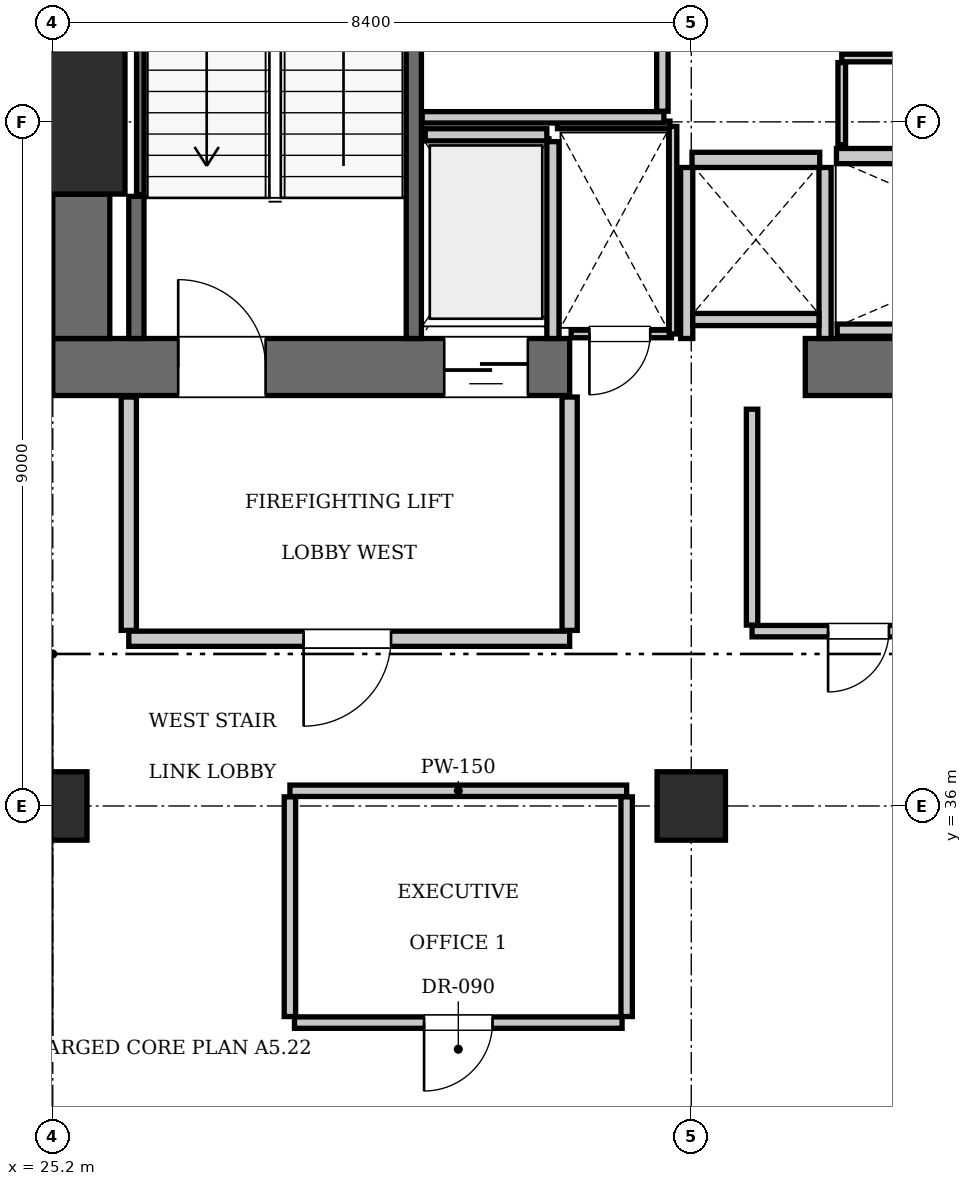
"""IFC4 building model, lengths in metres.
Left out: names, types, materials, properties, quantities, classifications, styles, units other than length and angle.
Written with IfcOpenShell. Run it as: python <this file> out.ifc"""

import sys

from ifc_helpers import new_model, si_unit, direction, frame, frame_2d, origin, origin_2d, place, context, subcontext, project, spatial, rectangle, extrude, element, fill, save


model = new_model("IFC4")
c1 = context("Model", 3, precision=1e-05, world=origin(), true_north=direction((0.0, 1.0)))
c2 = subcontext(c1, "Body", "Model", "MODEL_VIEW")
j1 = project(units=[si_unit("LENGTHUNIT", "METRE"), si_unit("PLANEANGLEUNIT", "RADIAN")], contexts=[c1])
p1 = place(None, origin())
s1 = spatial("IfcSite", under=j1, at=p1, CompositionType="ELEMENT")
p2 = place(p1, origin())
s2 = spatial("IfcBuilding", under=s1, at=p2, CompositionType="ELEMENT")
p3 = place(p2, frame((0.0, 0.0, 204.4)))
s3 = spatial("IfcBuildingStorey", under=s2, at=p3, CompositionType="ELEMENT", Elevation=204.4)
p4 = place(p3, frame((25.2, 45.0, 0.0), z_axis=(0.0, 0.0, 1.0), x_axis=(1.0, 0.0, 0.0)))
e1 = element("IfcColumn", 1, at=p4, inside=s3, PredefinedType="COLUMN", context=c2, shape_type="SweptSolid", body=[
    extrude(rectangle(XDim=1.9, YDim=1.9, at=origin_2d()), origin(), (0.0, 0.0, 1.0), 3.85),
])
p5 = place(p3, frame((25.2, 41.775, 0.0), z_axis=(0.0, 0.0, 1.0), x_axis=(1.0, 0.0, 0.0)))
e2 = element("IfcWall", 2, at=p5, inside=s3, PredefinedType="SHEAR", context=c2, shape_type="SweptSolid", body=[
    extrude(rectangle(XDim=6.8, YDim=0.75, at=frame_2d((3.4, 0.0))), origin(), (0.0, 0.0, 1.0), 3.85),
])
p6 = place(p5, frame((1.65, 0.0, 0.0)))
e3 = element("IfcOpeningElement", 3, at=p6, cuts=e2, PredefinedType="OPENING", context=c2, shape_type="SweptSolid", body=[
    extrude(rectangle(XDim=1.15, YDim=2.15, at=frame_2d((0.575, 1.075))), frame((0.0, 0.385, 0.0), z_axis=(0.0, -1.0, 0.0), x_axis=(1.0, 0.0, 0.0)), (0.0, 0.0, 1.0), 0.77),
])
p7 = place(p5, frame((5.15, 0.0, 0.0)))
e4 = element("IfcOpeningElement", 4, at=p7, cuts=e2, PredefinedType="OPENING", context=c2, shape_type="SweptSolid", body=[
    extrude(rectangle(XDim=1.1, YDim=2.2, at=frame_2d((0.55, 1.1))), frame((0.0, 0.385, 0.0), z_axis=(0.0, -1.0, 0.0), x_axis=(1.0, 0.0, 0.0)), (0.0, 0.0, 1.0), 0.77),
])
p8 = place(p3, frame((35.1, 41.775, 0.0), z_axis=(0.0, 0.0, 1.0), x_axis=(1.0, 0.0, 0.0)))
e5 = element("IfcWall", 5, at=p8, inside=s3, PredefinedType="SHEAR", context=c2, shape_type="SweptSolid", body=[
    extrude(rectangle(XDim=5.4, YDim=0.75, at=frame_2d((2.7, 0.0))), origin(), (0.0, 0.0, 1.0), 3.85),
])
p9 = place(p3, frame((25.575, 42.15, 0.0), z_axis=(0.0, 0.0, 1.0), x_axis=(0.0, 1.0, 0.0)))
e6 = element("IfcWall", 6, at=p9, inside=s3, PredefinedType="SHEAR", context=c2, shape_type="SweptSolid", body=[
    extrude(rectangle(XDim=1.9, YDim=0.75, at=frame_2d((0.95, 0.0))), origin(), (0.0, 0.0, 1.0), 3.85),
])
for number, where, z_axis, x_axis in (
    (7, (25.2, 36.0, 0.0), (0.0, 0.0, 1.0), (1.0, 0.0, 0.0)),
    (8, (33.6, 36.0, 0.0), (0.0, 0.0, 1.0), (1.0, 0.0, 0.0)),
):
    element("IfcColumn", number, at=place(p3, frame(where, z_axis=z_axis, x_axis=x_axis)), inside=s3, PredefinedType="COLUMN", context=c2, shape_type="SweptSolid", body=[
        extrude(rectangle(XDim=0.9, YDim=0.9, at=origin_2d()), origin(), (0.0, 0.0, 1.0), 3.85),
    ])
p10 = place(p3, frame((29.95, 42.15, 0.0), z_axis=(0.0, 0.0, 1.0), x_axis=(0.0, 1.0, 0.0)))
e9 = element("IfcWall", 9, at=p10, inside=s3, PredefinedType="SOLIDWALL", context=c2, shape_type="SweptSolid", body=[
    extrude(rectangle(XDim=9.0, YDim=0.2, at=frame_2d((4.5, 0.0))), origin(), (0.0, 0.0, 1.0), 3.61),
])
p11 = place(p3, frame((26.3, 42.15, 0.0), z_axis=(0.0, 0.0, 1.0), x_axis=(0.0, 1.0, 0.0)))
e10 = element("IfcWall", 10, at=p11, inside=s3, PredefinedType="SOLIDWALL", context=c2, shape_type="SweptSolid", body=[
    extrude(rectangle(XDim=1.87, YDim=0.2, at=frame_2d((0.935, 0.0))), origin(), (0.0, 0.0, 1.0), 3.61),
])
p12 = place(p3, frame((26.352, 44.04, 0.0), z_axis=(0.0, 0.0, 1.0), x_axis=(0.0, 1.0, 0.0)))
e11 = element("IfcWall", 11, at=p12, inside=s3, PredefinedType="SOLIDWALL", context=c2, shape_type="SweptSolid", body=[
    extrude(rectangle(XDim=1.92, YDim=0.1, at=frame_2d((0.96, 0.0))), origin(), (0.0, 0.0, 1.0), 3.61),
])
for number, where, z_axis, x_axis in (
    (12, (35.51, 44.55, 0.0), (0.0, 0.0, 1.0), (1.0, 0.0, 0.0)),
    (13, (33.61, 44.5, 0.0), (0.0, 0.0, 1.0), (1.0, 0.0, 0.0)),
):
    element("IfcWall", number, at=place(p3, frame(where, z_axis=z_axis, x_axis=x_axis)), inside=s3, PredefinedType="SOLIDWALL", context=c2, shape_type="SweptSolid", body=[
        extrude(rectangle(XDim=1.68, YDim=0.2, at=frame_2d((0.84, 0.0))), origin(), (0.0, 0.0, 1.0), 3.61),
    ])
p13 = place(p3, frame((30.1, 44.83, 0.0), z_axis=(0.0, 0.0, 1.0), x_axis=(1.0, 0.0, 0.0)))
e14 = element("IfcWall", 14, at=p13, inside=s3, PredefinedType="SOLIDWALL", context=c2, shape_type="SweptSolid", body=[
    extrude(rectangle(XDim=1.6, YDim=0.16, at=frame_2d((0.8, 0.0))), origin(), (0.0, 0.0, 1.0), 3.61),
])
p14 = place(p3, frame((31.78, 42.15, 0.0), z_axis=(0.0, 0.0, 1.0), x_axis=(0.0, 1.0, 0.0)))
e15 = element("IfcWall", 15, at=p14, inside=s3, PredefinedType="SOLIDWALL", context=c2, shape_type="SweptSolid", body=[
    extrude(rectangle(XDim=2.59, YDim=0.16, at=frame_2d((1.295, 0.0))), origin(), (0.0, 0.0, 1.0), 3.61),
])
p15 = place(p3, frame((35.52, 42.26, 0.0), z_axis=(0.0, 0.0, 1.0), x_axis=(1.0, 0.0, 0.0)))
e16 = element("IfcWall", 16, at=p15, inside=s3, PredefinedType="SOLIDWALL", context=c2, shape_type="SweptSolid", body=[
    extrude(rectangle(XDim=5.02, YDim=0.16, at=frame_2d((2.51, 0.0))), origin(), (0.0, 0.0, 1.0), 3.61),
])
for number, where, z_axis, x_axis in (
    (17, (33.54, 42.15, 0.0), (0.0, 0.0, 1.0), (0.0, 1.0, 0.0)),
    (18, (35.36, 42.15, 0.0), (0.0, 0.0, 1.0), (0.0, 1.0, 0.0)),
):
    element("IfcWall", number, at=place(p3, frame(where, z_axis=z_axis, x_axis=x_axis)), inside=s3, PredefinedType="SOLIDWALL", context=c2, shape_type="SweptSolid", body=[
        extrude(rectangle(XDim=2.25, YDim=0.16, at=frame_2d((1.125, 0.0))), origin(), (0.0, 0.0, 1.0), 3.61),
    ])
p16 = place(p3, frame((33.62, 42.4, 0.0), z_axis=(0.0, 0.0, 1.0), x_axis=(1.0, 0.0, 0.0)))
e19 = element("IfcWall", 19, at=p16, inside=s3, PredefinedType="SOLIDWALL", context=c2, shape_type="SweptSolid", body=[
    extrude(rectangle(XDim=1.66, YDim=0.16, at=frame_2d((0.83, 0.0))), origin(), (0.0, 0.0, 1.0), 3.61),
])
p17 = place(p3, frame((26.2, 38.2, 0.0), z_axis=(0.0, 0.0, 1.0), x_axis=(1.0, 0.0, 0.0)))
e20 = element("IfcWall", 20, at=p17, inside=s3, PredefinedType="PARTITIONING", context=c2, shape_type="SweptSolid", body=[
    extrude(rectangle(XDim=5.8, YDim=0.2, at=frame_2d((2.9, 0.0))), origin(), (0.0, 0.0, 1.0), 3.61),
])
p18 = place(p17, frame((2.3, 0.0, 0.0)))
e21 = element("IfcOpeningElement", 21, at=p18, cuts=e20, PredefinedType="OPENING", context=c2, shape_type="SweptSolid", body=[
    extrude(rectangle(XDim=1.15, YDim=2.15, at=frame_2d((0.575, 1.075))), frame((0.0, 0.11, 0.0), z_axis=(0.0, -1.0, 0.0), x_axis=(1.0, 0.0, 0.0)), (0.0, 0.0, 1.0), 0.22),
])
for number, where, z_axis, x_axis in (
    (22, (26.2, 38.31, 0.0), (0.0, 0.0, 1.0), (0.0, 1.0, 0.0)),
    (23, (32.0, 38.31, 0.0), (0.0, 0.0, 1.0), (0.0, 1.0, 0.0)),
):
    element("IfcWall", number, at=place(p3, frame(where, z_axis=z_axis, x_axis=x_axis)), inside=s3, PredefinedType="PARTITIONING", context=c2, shape_type="SweptSolid", body=[
        extrude(rectangle(XDim=3.07, YDim=0.2, at=frame_2d((1.535, 0.0))), origin(), (0.0, 0.0, 1.0), 3.61),
    ])
p19 = place(p3, frame((32.02, 42.21, 0.0), z_axis=(0.0, 0.0, 1.0), x_axis=(1.0, 0.0, 0.0)))
e24 = element("IfcWall", 24, at=p19, inside=s3, PredefinedType="PARTITIONING", context=c2, shape_type="SweptSolid", body=[
    extrude(rectangle(XDim=1.32, YDim=0.1, at=frame_2d((0.66, 0.0))), origin(), (0.0, 0.0, 1.0), 3.61),
])
p20 = place(p19, frame((0.24, 0.0, 0.0)))
e25 = element("IfcOpeningElement", 25, at=p20, cuts=e24, PredefinedType="OPENING", context=c2, shape_type="SweptSolid", body=[
    extrude(rectangle(XDim=0.8, YDim=2.05, at=frame_2d((0.4, 1.025))), frame((0.0, 0.06, 0.0), z_axis=(0.0, -1.0, 0.0), x_axis=(1.0, 0.0, 0.0)), (0.0, 0.0, 1.0), 0.12),
])
p21 = place(p3, frame((31.84, 44.96, 0.0), z_axis=(0.0, 0.0, 1.0), x_axis=(1.0, 0.0, 0.0)))
e26 = element("IfcWall", 26, at=p21, inside=s3, PredefinedType="PARTITIONING", context=c2, shape_type="SweptSolid", body=[
    extrude(rectangle(XDim=1.48, YDim=0.1, at=frame_2d((0.74, 0.0))), origin(), (0.0, 0.0, 1.0), 3.61),
])
p22 = place(p3, frame((33.36, 42.21, 0.0), z_axis=(0.0, 0.0, 1.0), x_axis=(0.0, 1.0, 0.0)))
e27 = element("IfcWall", 27, at=p22, inside=s3, PredefinedType="PARTITIONING", context=c2, shape_type="SweptSolid", body=[
    extrude(rectangle(XDim=2.73, YDim=0.1, at=frame_2d((1.365, 0.0))), origin(), (0.0, 0.0, 1.0), 3.61),
])
p23 = place(p3, frame((35.58, 45.84, 0.0), z_axis=(0.0, 0.0, 1.0), x_axis=(1.0, 0.0, 0.0)))
e28 = element("IfcWall", 28, at=p23, inside=s3, PredefinedType="PARTITIONING", context=c2, shape_type="SweptSolid", body=[
    extrude(rectangle(XDim=2.36, YDim=0.1, at=frame_2d((1.18, 0.0))), origin(), (0.0, 0.0, 1.0), 3.61),
])
p24 = place(p23, frame((0.7, 0.0, 0.0)))
e29 = element("IfcOpeningElement", 29, at=p24, cuts=e28, PredefinedType="OPENING", context=c2, shape_type="SweptSolid", body=[
    extrude(rectangle(XDim=0.8, YDim=2.05, at=frame_2d((0.4, 1.025))), frame((0.0, 0.06, 0.0), z_axis=(0.0, -1.0, 0.0), x_axis=(1.0, 0.0, 0.0)), (0.0, 0.0, 1.0), 0.12),
])
p25 = place(p3, frame((35.58, 44.7, 0.0), z_axis=(0.0, 0.0, 1.0), x_axis=(0.0, 1.0, 0.0)))
e30 = element("IfcWall", 30, at=p25, inside=s3, PredefinedType="PARTITIONING", context=c2, shape_type="SweptSolid", body=[
    extrude(rectangle(XDim=1.08, YDim=0.1, at=frame_2d((0.54, 0.0))), origin(), (0.0, 0.0, 1.0), 3.61),
])
p26 = place(p3, frame((30.06, 45.06, 0.0), z_axis=(0.0, 0.0, 1.0), x_axis=(1.0, 0.0, 0.0)))
e31 = element("IfcWall", 31, at=p26, inside=s3, PredefinedType="PARTITIONING", context=c2, shape_type="SweptSolid", body=[
    extrude(rectangle(XDim=3.18, YDim=0.15, at=frame_2d((1.59, 0.0))), origin(), (0.0, 0.0, 1.0), 3.61),
])
p27 = place(p3, frame((33.22, 45.14, 0.0), z_axis=(0.0, 0.0, 1.0), x_axis=(0.0, 1.0, 0.0)))
e32 = element("IfcWall", 32, at=p27, inside=s3, PredefinedType="PARTITIONING", context=c2, shape_type="SweptSolid", body=[
    extrude(rectangle(XDim=4.16, YDim=0.15, at=frame_2d((2.08, 0.0))), origin(), (0.0, 0.0, 1.0), 3.61),
])
p28 = place(p3, frame((34.4, 38.3, 0.0), z_axis=(0.0, 0.0, 1.0), x_axis=(1.0, 0.0, 0.0)))
e33 = element("IfcWall", 33, at=p28, inside=s3, PredefinedType="PARTITIONING", context=c2, shape_type="SweptSolid", body=[
    extrude(rectangle(XDim=2.88, YDim=0.15, at=frame_2d((1.44, 0.0))), origin(), (0.0, 0.0, 1.0), 3.61),
])
p29 = place(p28, frame((1.0, 0.0, 0.0)))
e34 = element("IfcOpeningElement", 34, at=p29, cuts=e33, PredefinedType="OPENING", context=c2, shape_type="SweptSolid", body=[
    extrude(rectangle(XDim=0.8, YDim=2.05, at=frame_2d((0.4, 1.025))), frame((0.0, 0.085, 0.0), z_axis=(0.0, -1.0, 0.0), x_axis=(1.0, 0.0, 0.0)), (0.0, 0.0, 1.0), 0.17),
])
p30 = place(p3, frame((34.4, 38.38, 0.0), z_axis=(0.0, 0.0, 1.0), x_axis=(0.0, 1.0, 0.0)))
e35 = element("IfcWall", 35, at=p30, inside=s3, PredefinedType="PARTITIONING", context=c2, shape_type="SweptSolid", body=[
    extrude(rectangle(XDim=2.84, YDim=0.15, at=frame_2d((1.42, 0.0))), origin(), (0.0, 0.0, 1.0), 3.61),
])
p31 = place(p3, frame((28.32, 36.2, 0.0), z_axis=(0.0, 0.0, 1.0), x_axis=(1.0, 0.0, 0.0)))
e36 = element("IfcWall", 36, at=p31, inside=s3, PredefinedType="PARTITIONING", context=c2, shape_type="SweptSolid", body=[
    extrude(rectangle(XDim=4.43, YDim=0.15, at=frame_2d((2.215, 0.0))), origin(), (0.0, 0.0, 1.0), 3.61),
])
for number, where, z_axis, x_axis in (
    (37, (28.32, 33.23, 0.0), (0.0, 0.0, 1.0), (0.0, 1.0, 0.0)),
    (38, (32.75, 33.23, 0.0), (0.0, 0.0, 1.0), (0.0, 1.0, 0.0)),
):
    element("IfcWall", number, at=place(p3, frame(where, z_axis=z_axis, x_axis=x_axis)), inside=s3, PredefinedType="PARTITIONING", context=c2, shape_type="SweptSolid", body=[
        extrude(rectangle(XDim=2.89, YDim=0.15, at=frame_2d((1.445, 0.0))), origin(), (0.0, 0.0, 1.0), 3.61),
    ])
p32 = place(p3, frame((28.38, 33.15, 0.0), z_axis=(0.0, 0.0, 1.0), x_axis=(1.0, 0.0, 0.0)))
e39 = element("IfcWall", 39, at=p32, inside=s3, PredefinedType="PARTITIONING", context=c2, shape_type="SweptSolid", body=[
    extrude(rectangle(XDim=4.31, YDim=0.15, at=frame_2d((2.155, 0.0))), origin(), (0.0, 0.0, 1.0), 3.61),
])
p33 = place(p32, frame((1.705, 0.0, 0.0)))
e40 = element("IfcOpeningElement", 40, at=p33, cuts=e39, PredefinedType="OPENING", context=c2, shape_type="SweptSolid", body=[
    extrude(rectangle(XDim=0.9, YDim=2.1, at=frame_2d((0.45, 1.05))), frame((0.0, 0.085, 0.0), z_axis=(0.0, -1.0, 0.0), x_axis=(1.0, 0.0, 0.0)), (0.0, 0.0, 1.0), 0.17),
])
p34 = place(p6, origin())
e41 = element("IfcDoor", 41, at=p34, inside=s3, OperationType="SINGLE_SWING_LEFT", PredefinedType="DOOR", context=c2, shape_type="SweptSolid", body=[
    extrude(rectangle(XDim=1.15, YDim=2.15, at=frame_2d((0.575, 1.075))), frame((0.0, 0.025, 0.0), z_axis=(0.0, -1.0, 0.0), x_axis=(1.0, 0.0, 0.0)), (0.0, 0.0, 1.0), 0.05),
])
fill(e3, e41)
p35 = place(p7, frame((1.1, 0.0, 0.0), z_axis=(0.0, 0.0, 1.0), x_axis=(-1.0, 0.0, 0.0)))
e42 = element("IfcDoor", 42, at=p35, inside=s3, OperationType="SLIDING_TO_LEFT", PredefinedType="DOOR", context=c2, shape_type="SweptSolid", body=[
    extrude(rectangle(XDim=1.1, YDim=2.2, at=frame_2d((0.55, 1.1))), frame((0.0, 0.025, 0.0), z_axis=(0.0, -1.0, 0.0), x_axis=(1.0, 0.0, 0.0)), (0.0, 0.0, 1.0), 0.05),
])
fill(e4, e42)
p36 = place(p18, frame((1.15, 0.0, 0.0), z_axis=(0.0, 0.0, 1.0), x_axis=(-1.0, 0.0, 0.0)))
e43 = element("IfcDoor", 43, at=p36, inside=s3, OperationType="SINGLE_SWING_RIGHT", PredefinedType="DOOR", context=c2, shape_type="SweptSolid", body=[
    extrude(rectangle(XDim=1.15, YDim=2.15, at=frame_2d((0.575, 1.075))), frame((0.0, 0.025, 0.0), z_axis=(0.0, -1.0, 0.0), x_axis=(1.0, 0.0, 0.0)), (0.0, 0.0, 1.0), 0.05),
])
fill(e21, e43)
p37 = place(p20, frame((0.8, 0.0, 0.0), z_axis=(0.0, 0.0, 1.0), x_axis=(-1.0, 0.0, 0.0)))
e44 = element("IfcDoor", 44, at=p37, inside=s3, OperationType="SINGLE_SWING_RIGHT", PredefinedType="DOOR", context=c2, shape_type="SweptSolid", body=[
    extrude(rectangle(XDim=0.8, YDim=2.05, at=frame_2d((0.4, 1.025))), frame((0.0, 0.025, 0.0), z_axis=(0.0, -1.0, 0.0), x_axis=(1.0, 0.0, 0.0)), (0.0, 0.0, 1.0), 0.05),
])
fill(e25, e44)
p38 = place(p29, frame((0.8, 0.0, 0.0), z_axis=(0.0, 0.0, 1.0), x_axis=(-1.0, 0.0, 0.0)))
e45 = element("IfcDoor", 45, at=p38, inside=s3, OperationType="SINGLE_SWING_RIGHT", PredefinedType="DOOR", context=c2, shape_type="SweptSolid", body=[
    extrude(rectangle(XDim=0.8, YDim=2.05, at=frame_2d((0.4, 1.025))), frame((0.0, 0.025, 0.0), z_axis=(0.0, -1.0, 0.0), x_axis=(1.0, 0.0, 0.0)), (0.0, 0.0, 1.0), 0.05),
])
fill(e34, e45)
p39 = place(p33, frame((0.9, 0.0, 0.0), z_axis=(0.0, 0.0, 1.0), x_axis=(-1.0, 0.0, 0.0)))
e46 = element("IfcDoor", 46, at=p39, inside=s3, OperationType="SINGLE_SWING_RIGHT", PredefinedType="DOOR", context=c2, shape_type="SweptSolid", body=[
    extrude(rectangle(XDim=0.9, YDim=2.1, at=frame_2d((0.45, 1.05))), frame((0.0, 0.025, 0.0), z_axis=(0.0, -1.0, 0.0), x_axis=(1.0, 0.0, 0.0)), (0.0, 0.0, 1.0), 0.05),
])
fill(e40, e46)
save(model, sys.argv[1])
